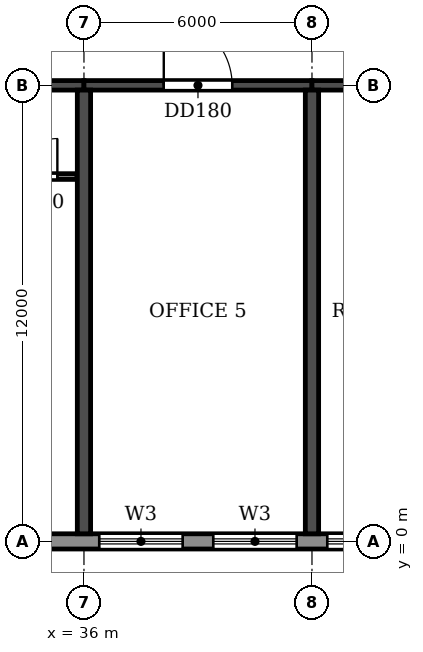
"""IFC4 building model, lengths in metres.
Left out: names, types, materials, properties, quantities, classifications, styles, units other than length and angle.
Written with IfcOpenShell. Run it as: python <this file> out.ifc"""

import sys

from ifc_helpers import new_model, si_unit, direction, frame, frame_2d, origin, place, context, subcontext, project, spatial, rectangle, extrude, element, fill, save


model = new_model("IFC4")
c1 = context("Model", 3, precision=1e-05, world=origin(), true_north=direction((0.0, 1.0)))
c2 = subcontext(c1, "Body", "Model", "MODEL_VIEW")
j1 = project(units=[si_unit("LENGTHUNIT", "METRE"), si_unit("PLANEANGLEUNIT", "RADIAN")], contexts=[c1])
p1 = place(None, origin())
s1 = spatial("IfcSite", under=j1, at=p1, CompositionType="ELEMENT")
p2 = place(p1, origin())
s2 = spatial("IfcBuilding", under=s1, at=p2, CompositionType="ELEMENT")
p3 = place(p2, frame((0.0, 0.0, 105.9)))
s3 = spatial("IfcBuildingStorey", under=s2, at=p3, CompositionType="ELEMENT", Elevation=105.9)
for number, where, z_axis, x_axis in (
    (1, (36.0, 0.2, 0.0), (0.0, 0.0, 1.0), (0.0, 1.0, 0.0)),
    (2, (42.0, 0.2, 0.0), (0.0, 0.0, 1.0), (0.0, 1.0, 0.0)),
):
    element("IfcWall", number, at=place(p3, frame(where, z_axis=z_axis, x_axis=x_axis)), inside=s3, PredefinedType="SHEAR", context=c2, shape_type="SweptSolid", body=[
        extrude(rectangle(XDim=11.675, YDim=0.35, at=frame_2d((5.837, 0.0))), origin(), (0.0, 0.0, 1.0), 3.06),
    ])
p4 = place(p3, frame((30.0, 12.0, 0.0), z_axis=(0.0, 0.0, 1.0), x_axis=(1.0, 0.0, 0.0)))
e3 = element("IfcWall", 3, at=p4, inside=s3, PredefinedType="SHEAR", context=c2, shape_type="SweptSolid", body=[
    extrude(rectangle(XDim=6.0, YDim=0.25, at=frame_2d((3.0, 0.0))), origin(), (0.0, 0.0, 1.0), 2.46),
])
p5 = place(p4, frame((2.55, 0.0, 0.0)))
e4 = element("IfcOpeningElement", 4, at=p5, cuts=e3, PredefinedType="OPENING", context=c2, shape_type="SweptSolid", body=[
    extrude(rectangle(XDim=0.9, YDim=2.1, at=frame_2d((0.45, 1.05))), frame((0.0, 0.135, 0.0), z_axis=(0.0, -1.0, 0.0), x_axis=(1.0, 0.0, 0.0)), (0.0, 0.0, 1.0), 0.27),
])
p6 = place(p3, frame((36.0, 12.0, 0.0), z_axis=(0.0, 0.0, 1.0), x_axis=(1.0, 0.0, 0.0)))
e5 = element("IfcWall", 5, at=p6, inside=s3, PredefinedType="SHEAR", context=c2, shape_type="SweptSolid", body=[
    extrude(rectangle(XDim=6.0, YDim=0.25, at=frame_2d((3.0, 0.0))), origin(), (0.0, 0.0, 1.0), 2.46),
])
p7 = place(p6, frame((2.1, 0.0, 0.0)))
e6 = element("IfcOpeningElement", 6, at=p7, cuts=e5, PredefinedType="OPENING", context=c2, shape_type="SweptSolid", body=[
    extrude(rectangle(XDim=1.8, YDim=2.1, at=frame_2d((0.9, 1.05))), frame((0.0, 0.135, 0.0), z_axis=(0.0, -1.0, 0.0), x_axis=(1.0, 0.0, 0.0)), (0.0, 0.0, 1.0), 0.27),
])
p8 = place(p3, frame((42.0, 12.0, 0.0), z_axis=(0.0, 0.0, 1.0), x_axis=(1.0, 0.0, 0.0)))
e7 = element("IfcWall", 7, at=p8, inside=s3, PredefinedType="SHEAR", context=c2, shape_type="SweptSolid", body=[
    extrude(rectangle(XDim=6.0, YDim=0.25, at=frame_2d((3.0, 0.0))), origin(), (0.0, 0.0, 1.0), 2.46),
])
p9 = place(p8, frame((2.1, 0.0, 0.0)))
e8 = element("IfcOpeningElement", 8, at=p9, cuts=e7, PredefinedType="OPENING", context=c2, shape_type="SweptSolid", body=[
    extrude(rectangle(XDim=1.8, YDim=2.1, at=frame_2d((0.9, 1.05))), frame((0.0, 0.135, 0.0), z_axis=(0.0, -1.0, 0.0), x_axis=(1.0, 0.0, 0.0)), (0.0, 0.0, 1.0), 0.27),
])
p10 = place(p3, frame((16.683, 0.0, 0.0), z_axis=(0.0, 0.0, 1.0), x_axis=(1.0, 0.0, 0.0)))
e9 = element("IfcWall", 9, at=p10, inside=s3, PredefinedType="STANDARD", context=c2, shape_type="SweptSolid", body=[
    extrude(rectangle(XDim=68.634, YDim=0.4, at=frame_2d((34.317, 0.0))), origin(), (0.0, 0.0, 1.0), 3.06),
])
p11 = place(p10, frame((1.717, 0.0, 0.6)))
e10 = element("IfcOpeningElement", 10, at=p11, cuts=e9, PredefinedType="OPENING", context=c2, shape_type="SweptSolid", body=[
    extrude(rectangle(XDim=2.2, YDim=1.8, at=frame_2d((1.1, 0.9))), frame((0.0, 0.21, 0.0), z_axis=(0.0, -1.0, 0.0), x_axis=(1.0, 0.0, 0.0)), (0.0, 0.0, 1.0), 0.42),
])
p12 = place(p10, frame((4.717, 0.0, 0.6)))
e11 = element("IfcOpeningElement", 11, at=p12, cuts=e9, PredefinedType="OPENING", context=c2, shape_type="SweptSolid", body=[
    extrude(rectangle(XDim=2.2, YDim=1.8, at=frame_2d((1.1, 0.9))), frame((0.0, 0.21, 0.0), z_axis=(0.0, -1.0, 0.0), x_axis=(1.0, 0.0, 0.0)), (0.0, 0.0, 1.0), 0.42),
])
p13 = place(p10, frame((7.717, 0.0, 0.6)))
e12 = element("IfcOpeningElement", 12, at=p13, cuts=e9, PredefinedType="OPENING", context=c2, shape_type="SweptSolid", body=[
    extrude(rectangle(XDim=2.2, YDim=1.8, at=frame_2d((1.1, 0.9))), frame((0.0, 0.21, 0.0), z_axis=(0.0, -1.0, 0.0), x_axis=(1.0, 0.0, 0.0)), (0.0, 0.0, 1.0), 0.42),
])
p14 = place(p10, frame((10.717, 0.0, 0.6)))
e13 = element("IfcOpeningElement", 13, at=p14, cuts=e9, PredefinedType="OPENING", context=c2, shape_type="SweptSolid", body=[
    extrude(rectangle(XDim=2.2, YDim=1.8, at=frame_2d((1.1, 0.9))), frame((0.0, 0.21, 0.0), z_axis=(0.0, -1.0, 0.0), x_axis=(1.0, 0.0, 0.0)), (0.0, 0.0, 1.0), 0.42),
])
p15 = place(p10, frame((19.717, 0.0, 0.6)))
e14 = element("IfcOpeningElement", 14, at=p15, cuts=e9, PredefinedType="OPENING", context=c2, shape_type="SweptSolid", body=[
    extrude(rectangle(XDim=2.2, YDim=1.8, at=frame_2d((1.1, 0.9))), frame((0.0, 0.21, 0.0), z_axis=(0.0, -1.0, 0.0), x_axis=(1.0, 0.0, 0.0)), (0.0, 0.0, 1.0), 0.42),
])
p16 = place(p10, frame((22.717, 0.0, 0.6)))
e15 = element("IfcOpeningElement", 15, at=p16, cuts=e9, PredefinedType="OPENING", context=c2, shape_type="SweptSolid", body=[
    extrude(rectangle(XDim=2.2, YDim=1.8, at=frame_2d((1.1, 0.9))), frame((0.0, 0.21, 0.0), z_axis=(0.0, -1.0, 0.0), x_axis=(1.0, 0.0, 0.0)), (0.0, 0.0, 1.0), 0.42),
])
p17 = place(p10, frame((25.717, 0.0, 0.6)))
e16 = element("IfcOpeningElement", 16, at=p17, cuts=e9, PredefinedType="OPENING", context=c2, shape_type="SweptSolid", body=[
    extrude(rectangle(XDim=2.2, YDim=1.8, at=frame_2d((1.1, 0.9))), frame((0.0, 0.21, 0.0), z_axis=(0.0, -1.0, 0.0), x_axis=(1.0, 0.0, 0.0)), (0.0, 0.0, 1.0), 0.42),
])
p18 = place(p10, frame((28.717, 0.0, 0.6)))
e17 = element("IfcOpeningElement", 17, at=p18, cuts=e9, PredefinedType="OPENING", context=c2, shape_type="SweptSolid", body=[
    extrude(rectangle(XDim=2.2, YDim=1.8, at=frame_2d((1.1, 0.9))), frame((0.0, 0.21, 0.0), z_axis=(0.0, -1.0, 0.0), x_axis=(1.0, 0.0, 0.0)), (0.0, 0.0, 1.0), 0.42),
])
p19 = place(p10, frame((37.717, 0.0, 0.6)))
e18 = element("IfcOpeningElement", 18, at=p19, cuts=e9, PredefinedType="OPENING", context=c2, shape_type="SweptSolid", body=[
    extrude(rectangle(XDim=2.2, YDim=1.8, at=frame_2d((1.1, 0.9))), frame((0.0, 0.21, 0.0), z_axis=(0.0, -1.0, 0.0), x_axis=(1.0, 0.0, 0.0)), (0.0, 0.0, 1.0), 0.42),
])
p20 = place(p10, frame((40.717, 0.0, 0.6)))
e19 = element("IfcOpeningElement", 19, at=p20, cuts=e9, PredefinedType="OPENING", context=c2, shape_type="SweptSolid", body=[
    extrude(rectangle(XDim=2.2, YDim=1.8, at=frame_2d((1.1, 0.9))), frame((0.0, 0.21, 0.0), z_axis=(0.0, -1.0, 0.0), x_axis=(1.0, 0.0, 0.0)), (0.0, 0.0, 1.0), 0.42),
])
p21 = place(p10, frame((43.717, 0.0, 0.6)))
e20 = element("IfcOpeningElement", 20, at=p21, cuts=e9, PredefinedType="OPENING", context=c2, shape_type="SweptSolid", body=[
    extrude(rectangle(XDim=2.2, YDim=1.8, at=frame_2d((1.1, 0.9))), frame((0.0, 0.21, 0.0), z_axis=(0.0, -1.0, 0.0), x_axis=(1.0, 0.0, 0.0)), (0.0, 0.0, 1.0), 0.42),
])
p22 = place(p10, frame((46.717, 0.0, 0.6)))
e21 = element("IfcOpeningElement", 21, at=p22, cuts=e9, PredefinedType="OPENING", context=c2, shape_type="SweptSolid", body=[
    extrude(rectangle(XDim=2.2, YDim=1.8, at=frame_2d((1.1, 0.9))), frame((0.0, 0.21, 0.0), z_axis=(0.0, -1.0, 0.0), x_axis=(1.0, 0.0, 0.0)), (0.0, 0.0, 1.0), 0.42),
])
p23 = place(p10, frame((49.717, 0.0, 0.6)))
e22 = element("IfcOpeningElement", 22, at=p23, cuts=e9, PredefinedType="OPENING", context=c2, shape_type="SweptSolid", body=[
    extrude(rectangle(XDim=2.2, YDim=1.8, at=frame_2d((1.1, 0.9))), frame((0.0, 0.21, 0.0), z_axis=(0.0, -1.0, 0.0), x_axis=(1.0, 0.0, 0.0)), (0.0, 0.0, 1.0), 0.42),
])
p24 = place(p10, frame((52.717, 0.0, 0.6)))
e23 = element("IfcOpeningElement", 23, at=p24, cuts=e9, PredefinedType="OPENING", context=c2, shape_type="SweptSolid", body=[
    extrude(rectangle(XDim=2.2, YDim=1.8, at=frame_2d((1.1, 0.9))), frame((0.0, 0.21, 0.0), z_axis=(0.0, -1.0, 0.0), x_axis=(1.0, 0.0, 0.0)), (0.0, 0.0, 1.0), 0.42),
])
p25 = place(p10, frame((55.717, 0.0, 0.6)))
e24 = element("IfcOpeningElement", 24, at=p25, cuts=e9, PredefinedType="OPENING", context=c2, shape_type="SweptSolid", body=[
    extrude(rectangle(XDim=2.2, YDim=1.8, at=frame_2d((1.1, 0.9))), frame((0.0, 0.21, 0.0), z_axis=(0.0, -1.0, 0.0), x_axis=(1.0, 0.0, 0.0)), (0.0, 0.0, 1.0), 0.42),
])
p26 = place(p10, frame((58.717, 0.0, 0.6)))
e25 = element("IfcOpeningElement", 25, at=p26, cuts=e9, PredefinedType="OPENING", context=c2, shape_type="SweptSolid", body=[
    extrude(rectangle(XDim=2.2, YDim=1.8, at=frame_2d((1.1, 0.9))), frame((0.0, 0.21, 0.0), z_axis=(0.0, -1.0, 0.0), x_axis=(1.0, 0.0, 0.0)), (0.0, 0.0, 1.0), 0.42),
])
p27 = place(p10, frame((61.717, 0.0, 0.6)))
e26 = element("IfcOpeningElement", 26, at=p27, cuts=e9, PredefinedType="OPENING", context=c2, shape_type="SweptSolid", body=[
    extrude(rectangle(XDim=2.2, YDim=1.8, at=frame_2d((1.1, 0.9))), frame((0.0, 0.21, 0.0), z_axis=(0.0, -1.0, 0.0), x_axis=(1.0, 0.0, 0.0)), (0.0, 0.0, 1.0), 0.42),
])
p28 = place(p10, frame((64.717, 0.0, 0.6)))
e27 = element("IfcOpeningElement", 27, at=p28, cuts=e9, PredefinedType="OPENING", context=c2, shape_type="SweptSolid", body=[
    extrude(rectangle(XDim=2.2, YDim=1.8, at=frame_2d((1.1, 0.9))), frame((0.0, 0.21, 0.0), z_axis=(0.0, -1.0, 0.0), x_axis=(1.0, 0.0, 0.0)), (0.0, 0.0, 1.0), 0.42),
])
p29 = place(p3, frame((30.185, 9.6, 0.0), z_axis=(0.0, 0.0, 1.0), x_axis=(1.0, 0.0, 0.0)))
e28 = element("IfcWall", 28, at=p29, inside=s3, PredefinedType="PARTITIONING", context=c2, shape_type="SweptSolid", body=[
    extrude(rectangle(XDim=5.63, YDim=0.15, at=frame_2d((2.815, 0.0))), origin(), (0.0, 0.0, 1.0), 3.06),
])
p30 = place(p29, frame((1.115, 0.0, 0.0)))
e29 = element("IfcOpeningElement", 29, at=p30, cuts=e28, PredefinedType="OPENING", context=c2, shape_type="SweptSolid", body=[
    extrude(rectangle(XDim=1.0, YDim=2.1, at=frame_2d((0.5, 1.05))), frame((0.0, 0.085, 0.0), z_axis=(0.0, -1.0, 0.0), x_axis=(1.0, 0.0, 0.0)), (0.0, 0.0, 1.0), 0.17),
])
p31 = place(p29, frame((4.115, 0.0, 0.0)))
e30 = element("IfcOpeningElement", 30, at=p31, cuts=e28, PredefinedType="OPENING", context=c2, shape_type="SweptSolid", body=[
    extrude(rectangle(XDim=1.0, YDim=2.1, at=frame_2d((0.5, 1.05))), frame((0.0, 0.085, 0.0), z_axis=(0.0, -1.0, 0.0), x_axis=(1.0, 0.0, 0.0)), (0.0, 0.0, 1.0), 0.17),
])
p32 = place(p15, origin())
e31 = element("IfcWindow", 31, at=p32, inside=s3, PartitioningType="DOUBLE_PANEL_HORIZONTAL", PredefinedType="WINDOW", context=c2, shape_type="SweptSolid", body=[
    extrude(rectangle(XDim=2.2, YDim=1.8, at=frame_2d((1.1, 0.9))), frame((0.0, 0.03, 0.0), z_axis=(0.0, -1.0, 0.0), x_axis=(1.0, 0.0, 0.0)), (0.0, 0.0, 1.0), 0.06),
])
fill(e14, e31)
p33 = place(p16, origin())
e32 = element("IfcWindow", 32, at=p33, inside=s3, PartitioningType="DOUBLE_PANEL_HORIZONTAL", PredefinedType="WINDOW", context=c2, shape_type="SweptSolid", body=[
    extrude(rectangle(XDim=2.2, YDim=1.8, at=frame_2d((1.1, 0.9))), frame((0.0, 0.03, 0.0), z_axis=(0.0, -1.0, 0.0), x_axis=(1.0, 0.0, 0.0)), (0.0, 0.0, 1.0), 0.06),
])
fill(e15, e32)
p34 = place(p17, origin())
e33 = element("IfcWindow", 33, at=p34, inside=s3, PartitioningType="DOUBLE_PANEL_HORIZONTAL", PredefinedType="WINDOW", context=c2, shape_type="SweptSolid", body=[
    extrude(rectangle(XDim=2.2, YDim=1.8, at=frame_2d((1.1, 0.9))), frame((0.0, 0.03, 0.0), z_axis=(0.0, -1.0, 0.0), x_axis=(1.0, 0.0, 0.0)), (0.0, 0.0, 1.0), 0.06),
])
fill(e16, e33)
p35 = place(p7, origin())
e34 = element("IfcDoor", 34, at=p35, inside=s3, OperationType="DOUBLE_DOOR_SINGLE_SWING", PredefinedType="DOOR", context=c2, shape_type="SweptSolid", body=[
    extrude(rectangle(XDim=1.8, YDim=2.1, at=frame_2d((0.9, 1.05))), frame((0.0, 0.025, 0.0), z_axis=(0.0, -1.0, 0.0), x_axis=(1.0, 0.0, 0.0)), (0.0, 0.0, 1.0), 0.05),
])
fill(e6, e34)
p36 = place(p31, origin())
e35 = element("IfcDoor", 35, at=p36, inside=s3, OperationType="SINGLE_SWING_RIGHT", PredefinedType="DOOR", context=c2, shape_type="SweptSolid", body=[
    extrude(rectangle(XDim=1.0, YDim=2.1, at=frame_2d((0.5, 1.05))), frame((0.0, 0.025, 0.0), z_axis=(0.0, -1.0, 0.0), x_axis=(1.0, 0.0, 0.0)), (0.0, 0.0, 1.0), 0.05),
])
fill(e30, e35)
save(model, sys.argv[1])
